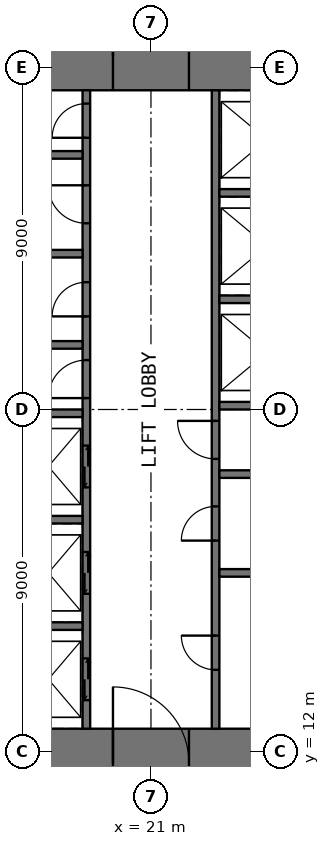
"""IFC4 building model, lengths in metres.
Left out: names, types, materials, properties, quantities, classifications, styles, units other than length and angle.
Written with IfcOpenShell. Run it as: python <this file> out.ifc"""

import sys

from ifc_helpers import new_model, si_unit, direction, frame, frame_2d, origin, place, context, subcontext, project, spatial, rectangle, extrude, element, fill, save


model = new_model("IFC4")
c1 = context("Model", 3, precision=1e-05, world=origin(), true_north=direction((0.0, 1.0)))
c2 = subcontext(c1, "Body", "Model", "MODEL_VIEW")
j1 = project(units=[si_unit("LENGTHUNIT", "METRE"), si_unit("PLANEANGLEUNIT", "RADIAN")], contexts=[c1])
p1 = place(None, origin())
s1 = spatial("IfcSite", under=j1, at=p1, CompositionType="ELEMENT")
p2 = place(p1, origin())
s2 = spatial("IfcBuilding", under=s1, at=p2, CompositionType="ELEMENT")
p3 = place(p2, frame((0.0, 0.0, 30.5)))
s3 = spatial("IfcBuildingStorey", under=s2, at=p3, CompositionType="ELEMENT", Elevation=30.5)
p4 = place(p3, frame((10.8, 11.7, -0.05), z_axis=(0.0, 0.0, 1.0), x_axis=(1.0, 0.0, 0.0)))
e1 = element("IfcWall", 1, at=p4, inside=s3, PredefinedType="SHEAR", context=c2, shape_type="SweptSolid", body=[
    extrude(rectangle(XDim=20.4, YDim=1.8, at=frame_2d((10.2, 0.0))), origin(), (0.0, 0.0, 1.0), 4.0),
])
p5 = place(p4, frame((9.2, 0.0, 0.05)))
e2 = element("IfcOpeningElement", 2, at=p5, cuts=e1, PredefinedType="OPENING", context=c2, shape_type="SweptSolid", body=[
    extrude(rectangle(XDim=2.0, YDim=2.2, at=frame_2d((1.0, 1.1))), frame((0.0, 0.91, 0.0), z_axis=(0.0, -1.0, 0.0), x_axis=(1.0, 0.0, 0.0)), (0.0, 0.0, 1.0), 1.82),
])
p6 = place(p3, frame((10.8, 30.3, -0.05), z_axis=(0.0, 0.0, 1.0), x_axis=(1.0, 0.0, 0.0)))
e3 = element("IfcWall", 3, at=p6, inside=s3, PredefinedType="SHEAR", context=c2, shape_type="SweptSolid", body=[
    extrude(rectangle(XDim=20.4, YDim=1.8, at=frame_2d((10.2, 0.0))), origin(), (0.0, 0.0, 1.0), 4.0),
])
p7 = place(p6, frame((9.2, 0.0, 0.05)))
e4 = element("IfcOpeningElement", 4, at=p7, cuts=e3, PredefinedType="OPENING", context=c2, shape_type="SweptSolid", body=[
    extrude(rectangle(XDim=2.0, YDim=2.2, at=frame_2d((1.0, 1.1))), frame((0.0, 0.91, 0.0), z_axis=(0.0, -1.0, 0.0), x_axis=(1.0, 0.0, 0.0)), (0.0, 0.0, 1.0), 1.82),
])
p8 = place(p3, frame((19.3, 12.6, -0.05), z_axis=(0.0, 0.0, 1.0), x_axis=(0.0, 1.0, 0.0)))
e5 = element("IfcWall", 5, at=p8, inside=s3, PredefinedType="SHEAR", context=c2, shape_type="SweptSolid", body=[
    extrude(rectangle(XDim=16.8, YDim=0.2, at=frame_2d((8.4, 0.0))), origin(), (0.0, 0.0, 1.0), 4.0),
])
p9 = place(p8, frame((8.7, 0.0, 0.05)))
e6 = element("IfcOpeningElement", 6, at=p9, cuts=e5, PredefinedType="OPENING", context=c2, shape_type="SweptSolid", body=[
    extrude(rectangle(XDim=1.0, YDim=2.2, at=frame_2d((0.5, 1.1))), frame((0.0, 0.11, 0.0), z_axis=(0.0, -1.0, 0.0), x_axis=(1.0, 0.0, 0.0)), (0.0, 0.0, 1.0), 0.22),
])
p10 = place(p8, frame((10.85, 0.0, 0.05)))
e7 = element("IfcOpeningElement", 7, at=p10, cuts=e5, PredefinedType="OPENING", context=c2, shape_type="SweptSolid", body=[
    extrude(rectangle(XDim=0.9, YDim=2.2, at=frame_2d((0.45, 1.1))), frame((0.0, 0.11, 0.0), z_axis=(0.0, -1.0, 0.0), x_axis=(1.0, 0.0, 0.0)), (0.0, 0.0, 1.0), 0.22),
])
p11 = place(p8, frame((13.3, 0.0, 0.05)))
e8 = element("IfcOpeningElement", 8, at=p11, cuts=e5, PredefinedType="OPENING", context=c2, shape_type="SweptSolid", body=[
    extrude(rectangle(XDim=1.0, YDim=2.2, at=frame_2d((0.5, 1.1))), frame((0.0, 0.11, 0.0), z_axis=(0.0, -1.0, 0.0), x_axis=(1.0, 0.0, 0.0)), (0.0, 0.0, 1.0), 0.22),
])
p12 = place(p8, frame((15.55, 0.0, 0.05)))
e9 = element("IfcOpeningElement", 9, at=p12, cuts=e5, PredefinedType="OPENING", context=c2, shape_type="SweptSolid", body=[
    extrude(rectangle(XDim=0.9, YDim=2.2, at=frame_2d((0.45, 1.1))), frame((0.0, 0.11, 0.0), z_axis=(0.0, -1.0, 0.0), x_axis=(1.0, 0.0, 0.0)), (0.0, 0.0, 1.0), 0.22),
])
p13 = place(p8, frame((0.75, 0.0, 0.05)))
e10 = element("IfcOpeningElement", 10, at=p13, cuts=e5, PredefinedType="OPENING", context=c2, shape_type="SweptSolid", body=[
    extrude(rectangle(XDim=1.1, YDim=2.2, at=frame_2d((0.55, 1.1))), frame((0.0, 0.11, 0.0), z_axis=(0.0, -1.0, 0.0), x_axis=(1.0, 0.0, 0.0)), (0.0, 0.0, 1.0), 0.22),
])
p14 = place(p8, frame((3.55, 0.0, 0.05)))
e11 = element("IfcOpeningElement", 11, at=p14, cuts=e5, PredefinedType="OPENING", context=c2, shape_type="SweptSolid", body=[
    extrude(rectangle(XDim=1.1, YDim=2.2, at=frame_2d((0.55, 1.1))), frame((0.0, 0.11, 0.0), z_axis=(0.0, -1.0, 0.0), x_axis=(1.0, 0.0, 0.0)), (0.0, 0.0, 1.0), 0.22),
])
p15 = place(p8, frame((6.35, 0.0, 0.05)))
e12 = element("IfcOpeningElement", 12, at=p15, cuts=e5, PredefinedType="OPENING", context=c2, shape_type="SweptSolid", body=[
    extrude(rectangle(XDim=1.1, YDim=2.2, at=frame_2d((0.55, 1.1))), frame((0.0, 0.11, 0.0), z_axis=(0.0, -1.0, 0.0), x_axis=(1.0, 0.0, 0.0)), (0.0, 0.0, 1.0), 0.22),
])
p16 = place(p3, frame((22.7, 12.6, -0.05), z_axis=(0.0, 0.0, 1.0), x_axis=(0.0, 1.0, 0.0)))
e13 = element("IfcWall", 13, at=p16, inside=s3, PredefinedType="SHEAR", context=c2, shape_type="SweptSolid", body=[
    extrude(rectangle(XDim=16.8, YDim=0.2, at=frame_2d((8.4, 0.0))), origin(), (0.0, 0.0, 1.0), 4.0),
])
p17 = place(p16, frame((7.1, 0.0, 0.05)))
e14 = element("IfcOpeningElement", 14, at=p17, cuts=e13, PredefinedType="OPENING", context=c2, shape_type="SweptSolid", body=[
    extrude(rectangle(XDim=1.0, YDim=2.2, at=frame_2d((0.5, 1.1))), frame((0.0, 0.11, 0.0), z_axis=(0.0, -1.0, 0.0), x_axis=(1.0, 0.0, 0.0)), (0.0, 0.0, 1.0), 0.22),
])
p18 = place(p16, frame((1.55, 0.0, 0.05)))
e15 = element("IfcOpeningElement", 15, at=p18, cuts=e13, PredefinedType="OPENING", context=c2, shape_type="SweptSolid", body=[
    extrude(rectangle(XDim=0.9, YDim=2.2, at=frame_2d((0.45, 1.1))), frame((0.0, 0.11, 0.0), z_axis=(0.0, -1.0, 0.0), x_axis=(1.0, 0.0, 0.0)), (0.0, 0.0, 1.0), 0.22),
])
p19 = place(p16, frame((4.95, 0.0, 0.05)))
e16 = element("IfcOpeningElement", 16, at=p19, cuts=e13, PredefinedType="OPENING", context=c2, shape_type="SweptSolid", body=[
    extrude(rectangle(XDim=0.9, YDim=2.2, at=frame_2d((0.45, 1.1))), frame((0.0, 0.11, 0.0), z_axis=(0.0, -1.0, 0.0), x_axis=(1.0, 0.0, 0.0)), (0.0, 0.0, 1.0), 0.22),
])
for number, where, z_axis, x_axis in (
    (17, (16.0, 15.3, -0.05), (0.0, 0.0, 1.0), (1.0, 0.0, 0.0)),
    (18, (16.0, 18.1, -0.05), (0.0, 0.0, 1.0), (1.0, 0.0, 0.0)),
    (19, (16.0, 20.9, -0.05), (0.0, 0.0, 1.0), (1.0, 0.0, 0.0)),
    (20, (16.0, 22.7, -0.05), (0.0, 0.0, 1.0), (1.0, 0.0, 0.0)),
    (21, (16.0, 25.1, -0.05), (0.0, 0.0, 1.0), (1.0, 0.0, 0.0)),
    (22, (16.0, 27.7, -0.05), (0.0, 0.0, 1.0), (1.0, 0.0, 0.0)),
    (23, (22.8, 16.7, -0.05), (0.0, 0.0, 1.0), (1.0, 0.0, 0.0)),
    (24, (22.8, 19.3, -0.05), (0.0, 0.0, 1.0), (1.0, 0.0, 0.0)),
    (25, (22.8, 21.1, -0.05), (0.0, 0.0, 1.0), (1.0, 0.0, 0.0)),
    (26, (22.8, 23.9, -0.05), (0.0, 0.0, 1.0), (1.0, 0.0, 0.0)),
    (27, (22.8, 26.7, -0.05), (0.0, 0.0, 1.0), (1.0, 0.0, 0.0)),
):
    element("IfcWall", number, at=place(p3, frame(where, z_axis=z_axis, x_axis=x_axis)), inside=s3, PredefinedType="SHEAR", context=c2, shape_type="SweptSolid", body=[
        extrude(rectangle(XDim=3.2, YDim=0.2, at=frame_2d((1.6, 0.0))), origin(), (0.0, 0.0, 1.0), 4.0),
    ])
p20 = place(p5, origin())
e28 = element("IfcDoor", 28, at=p20, inside=s3, OperationType="DOUBLE_DOOR_SINGLE_SWING", PredefinedType="DOOR", context=c2, shape_type="SweptSolid", body=[
    extrude(rectangle(XDim=2.0, YDim=2.2, at=frame_2d((1.0, 1.1))), frame((0.0, 0.025, 0.0), z_axis=(0.0, -1.0, 0.0), x_axis=(1.0, 0.0, 0.0)), (0.0, 0.0, 1.0), 0.05),
])
fill(e2, e28)
p21 = place(p7, origin())
e29 = element("IfcDoor", 29, at=p21, inside=s3, OperationType="DOUBLE_DOOR_SINGLE_SWING", PredefinedType="DOOR", context=c2, shape_type="SweptSolid", body=[
    extrude(rectangle(XDim=2.0, YDim=2.2, at=frame_2d((1.0, 1.1))), frame((0.0, 0.025, 0.0), z_axis=(0.0, -1.0, 0.0), x_axis=(1.0, 0.0, 0.0)), (0.0, 0.0, 1.0), 0.05),
])
fill(e4, e29)
p22 = place(p9, origin())
e30 = element("IfcDoor", 30, at=p22, inside=s3, OperationType="SINGLE_SWING_LEFT", PredefinedType="DOOR", context=c2, shape_type="SweptSolid", body=[
    extrude(rectangle(XDim=1.0, YDim=2.2, at=frame_2d((0.5, 1.1))), frame((0.0, 0.025, 0.0), z_axis=(0.0, -1.0, 0.0), x_axis=(1.0, 0.0, 0.0)), (0.0, 0.0, 1.0), 0.05),
])
fill(e6, e30)
p23 = place(p17, origin())
e31 = element("IfcDoor", 31, at=p23, inside=s3, OperationType="SINGLE_SWING_RIGHT", PredefinedType="DOOR", context=c2, shape_type="SweptSolid", body=[
    extrude(rectangle(XDim=1.0, YDim=2.2, at=frame_2d((0.5, 1.1))), frame((0.0, 0.025, 0.0), z_axis=(0.0, -1.0, 0.0), x_axis=(1.0, 0.0, 0.0)), (0.0, 0.0, 1.0), 0.05),
])
fill(e14, e31)
p24 = place(p10, origin())
e32 = element("IfcDoor", 32, at=p24, inside=s3, OperationType="SINGLE_SWING_LEFT", PredefinedType="DOOR", context=c2, shape_type="SweptSolid", body=[
    extrude(rectangle(XDim=0.9, YDim=2.2, at=frame_2d((0.45, 1.1))), frame((0.0, 0.025, 0.0), z_axis=(0.0, -1.0, 0.0), x_axis=(1.0, 0.0, 0.0)), (0.0, 0.0, 1.0), 0.05),
])
fill(e7, e32)
p25 = place(p11, origin())
e33 = element("IfcDoor", 33, at=p25, inside=s3, OperationType="SINGLE_SWING_RIGHT", PredefinedType="DOOR", context=c2, shape_type="SweptSolid", body=[
    extrude(rectangle(XDim=1.0, YDim=2.2, at=frame_2d((0.5, 1.1))), frame((0.0, 0.025, 0.0), z_axis=(0.0, -1.0, 0.0), x_axis=(1.0, 0.0, 0.0)), (0.0, 0.0, 1.0), 0.05),
])
fill(e8, e33)
p26 = place(p12, origin())
e34 = element("IfcDoor", 34, at=p26, inside=s3, OperationType="SINGLE_SWING_LEFT", PredefinedType="DOOR", context=c2, shape_type="SweptSolid", body=[
    extrude(rectangle(XDim=0.9, YDim=2.2, at=frame_2d((0.45, 1.1))), frame((0.0, 0.025, 0.0), z_axis=(0.0, -1.0, 0.0), x_axis=(1.0, 0.0, 0.0)), (0.0, 0.0, 1.0), 0.05),
])
fill(e9, e34)
p27 = place(p18, origin())
e35 = element("IfcDoor", 35, at=p27, inside=s3, OperationType="SINGLE_SWING_RIGHT", PredefinedType="DOOR", context=c2, shape_type="SweptSolid", body=[
    extrude(rectangle(XDim=0.9, YDim=2.2, at=frame_2d((0.45, 1.1))), frame((0.0, 0.025, 0.0), z_axis=(0.0, -1.0, 0.0), x_axis=(1.0, 0.0, 0.0)), (0.0, 0.0, 1.0), 0.05),
])
fill(e15, e35)
p28 = place(p19, origin())
e36 = element("IfcDoor", 36, at=p28, inside=s3, OperationType="SINGLE_SWING_LEFT", PredefinedType="DOOR", context=c2, shape_type="SweptSolid", body=[
    extrude(rectangle(XDim=0.9, YDim=2.2, at=frame_2d((0.45, 1.1))), frame((0.0, 0.025, 0.0), z_axis=(0.0, -1.0, 0.0), x_axis=(1.0, 0.0, 0.0)), (0.0, 0.0, 1.0), 0.05),
])
fill(e16, e36)
p29 = place(p13, origin())
e37 = element("IfcDoor", 37, at=p29, inside=s3, OperationType="DOUBLE_DOOR_SLIDING", PredefinedType="DOOR", context=c2, shape_type="SweptSolid", body=[
    extrude(rectangle(XDim=1.1, YDim=2.2, at=frame_2d((0.55, 1.1))), frame((0.0, 0.025, 0.0), z_axis=(0.0, -1.0, 0.0), x_axis=(1.0, 0.0, 0.0)), (0.0, 0.0, 1.0), 0.05),
])
fill(e10, e37)
p30 = place(p14, origin())
e38 = element("IfcDoor", 38, at=p30, inside=s3, OperationType="DOUBLE_DOOR_SLIDING", PredefinedType="DOOR", context=c2, shape_type="SweptSolid", body=[
    extrude(rectangle(XDim=1.1, YDim=2.2, at=frame_2d((0.55, 1.1))), frame((0.0, 0.025, 0.0), z_axis=(0.0, -1.0, 0.0), x_axis=(1.0, 0.0, 0.0)), (0.0, 0.0, 1.0), 0.05),
])
fill(e11, e38)
p31 = place(p15, origin())
e39 = element("IfcDoor", 39, at=p31, inside=s3, OperationType="DOUBLE_DOOR_SLIDING", PredefinedType="DOOR", context=c2, shape_type="SweptSolid", body=[
    extrude(rectangle(XDim=1.1, YDim=2.2, at=frame_2d((0.55, 1.1))), frame((0.0, 0.025, 0.0), z_axis=(0.0, -1.0, 0.0), x_axis=(1.0, 0.0, 0.0)), (0.0, 0.0, 1.0), 0.05),
])
fill(e12, e39)
save(model, sys.argv[1])
